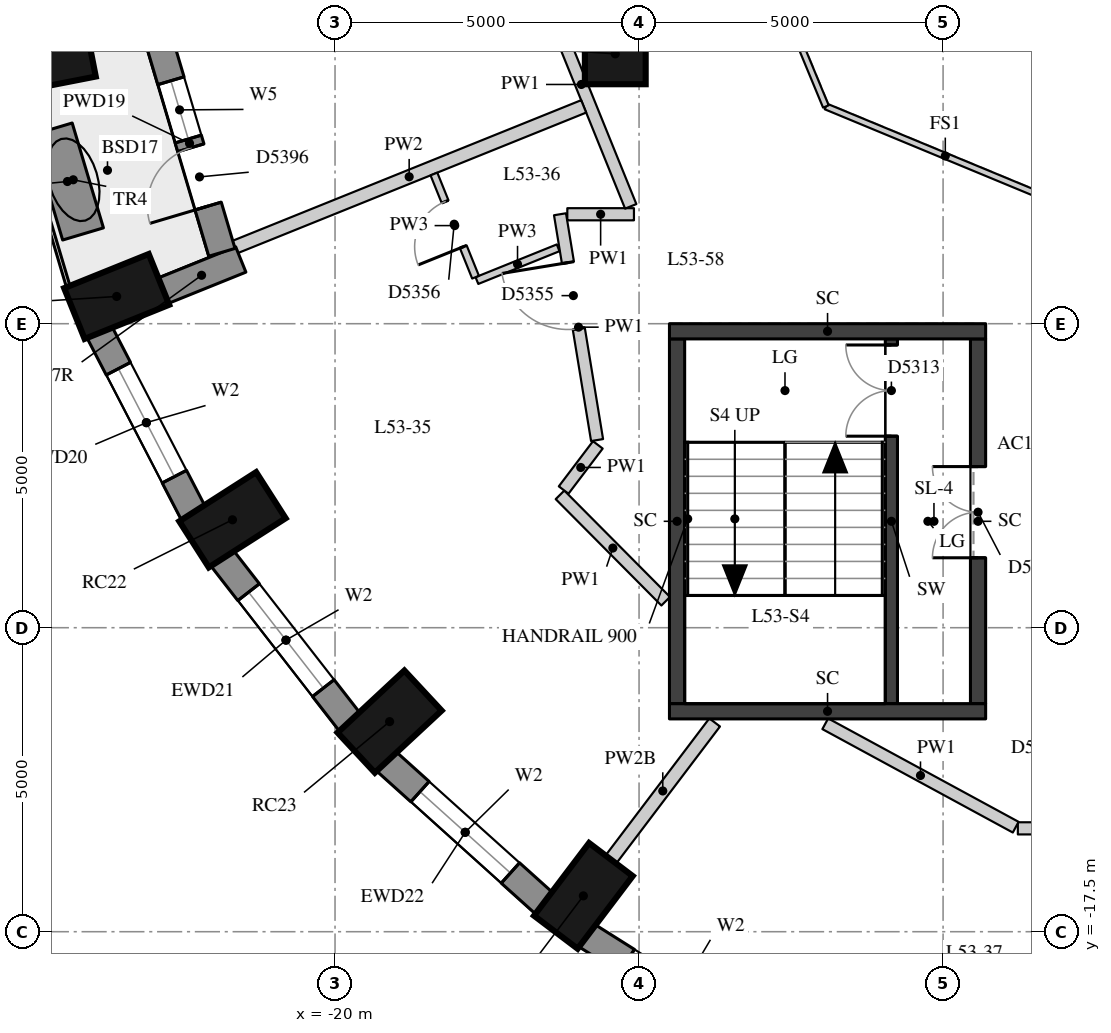
"""IFC4 building model, lengths in metres.
Left out: names, types, materials, properties, quantities, classifications, styles, units other than length and angle.
Written with IfcOpenShell. Run it as: python <this file> out.ifc"""

import sys

from ifc_helpers import new_model, si_unit, direction, frame, frame_2d, origin, origin_2d, place, context, subcontext, project, spatial, rectangle, extrude, element, fill, save


model = new_model("IFC4")
c1 = context("Model", 3, precision=1e-05, world=origin(), true_north=direction((0.0, 1.0)))
c2 = subcontext(c1, "Body", "Model", "MODEL_VIEW")
j1 = project(units=[si_unit("LENGTHUNIT", "METRE"), si_unit("PLANEANGLEUNIT", "RADIAN")], contexts=[c1])
p1 = place(None, origin())
s1 = spatial("IfcSite", under=j1, at=p1, CompositionType="ELEMENT")
p2 = place(p1, origin())
s2 = spatial("IfcBuilding", under=s1, at=p2, CompositionType="ELEMENT")
p3 = place(p2, frame((0.0, 0.0, 189.2)))
s3 = spatial("IfcBuildingStorey", under=s2, at=p3, CompositionType="ELEMENT", Elevation=189.2)
for number, where, z_axis, x_axis in (
    (1, (-24.757, -3.137, 0.0), (0.0, 0.0, 1.0), (-0.981, -0.192, 0.0)),
    (2, (-23.591, -7.052, 0.0), (0.0, 0.0, 1.0), (-0.927, -0.374, 0.0)),
    (3, (-21.687, -10.725, 0.0), (0.0, 0.0, 1.0), (-0.842, -0.539, 0.0)),
    (4, (-19.102, -14.045, 0.0), (0.0, 0.0, 1.0), (-0.732, -0.681, 0.0)),
    (5, (-15.916, -16.911, 0.0), (0.0, 0.0, 1.0), (-0.604, -0.797, 0.0)),
):
    element("IfcColumn", number, at=place(p3, frame(where, z_axis=z_axis, x_axis=x_axis)), inside=s3, PredefinedType="COLUMN", context=c2, shape_type="SweptSolid", body=[
        extrude(rectangle(XDim=1.5, YDim=0.9, at=origin_2d()), origin(), (0.0, 0.0, 1.0), 3.3),
    ])
p4 = place(p3, frame((-15.391, -3.062, 0.0), z_axis=(0.0, 0.0, 1.0), x_axis=(1.0, 0.0, 0.0)))
e6 = element("IfcColumn", 6, at=p4, inside=s3, PredefinedType="COLUMN", context=c2, shape_type="SweptSolid", body=[
    extrude(rectangle(XDim=1.0, YDim=1.0, at=origin_2d()), origin(), (0.0, 0.0, 1.0), 3.3),
])
p5 = place(p3, frame((-23.878, -7.632, 0.0), z_axis=(0.0, 0.0, 1.0), x_axis=(0.460232593174, -0.887798378113, 0.0)))
e7 = element("IfcWall", 7, at=p5, inside=s3, PredefinedType="SOLIDWALL", context=c2, shape_type="SweptSolid", body=[
    extrude(rectangle(XDim=3.371, YDim=0.45, at=frame_2d((1.685, 0.0))), origin(), (0.0, 0.0, 1.0), 3.02),
])
p6 = place(p5, frame((0.685, 0.0, 0.4)))
e8 = element("IfcOpeningElement", 8, at=p6, cuts=e7, PredefinedType="OPENING", context=c2, shape_type="SweptSolid", body=[
    extrude(rectangle(XDim=2.0, YDim=1.75, at=frame_2d((1.0, 0.875))), frame((0.0, 0.235, 0.0), z_axis=(0.0, -1.0, 0.0), x_axis=(1.0, 0.0, 0.0)), (0.0, 0.0, 1.0), 0.47),
])
p7 = place(p3, frame((-21.863, -11.348, 0.0), z_axis=(0.0, 0.0, 1.0), x_axis=(0.614255239631, -0.789107407509, 0.0)))
e9 = element("IfcWall", 9, at=p7, inside=s3, PredefinedType="SOLIDWALL", context=c2, shape_type="SweptSolid", body=[
    extrude(rectangle(XDim=3.438, YDim=0.45, at=frame_2d((1.719, 0.0))), origin(), (0.0, 0.0, 1.0), 3.02),
])
p8 = place(p7, frame((0.719, 0.0, 0.4)))
e10 = element("IfcOpeningElement", 10, at=p8, cuts=e9, PredefinedType="OPENING", context=c2, shape_type="SweptSolid", body=[
    extrude(rectangle(XDim=2.0, YDim=1.75, at=frame_2d((1.0, 0.875))), frame((0.0, 0.235, 0.0), z_axis=(0.0, -1.0, 0.0), x_axis=(1.0, 0.0, 0.0)), (0.0, 0.0, 1.0), 0.47),
])
p9 = place(p3, frame((-19.165, -14.69, 0.0), z_axis=(0.0, 0.0, 1.0), x_axis=(0.743442727602, -0.668799604348, 0.0)))
e11 = element("IfcWall", 11, at=p9, inside=s3, PredefinedType="SOLIDWALL", context=c2, shape_type="SweptSolid", body=[
    extrude(rectangle(XDim=3.513, YDim=0.45, at=frame_2d((1.756, 0.0))), origin(), (0.0, 0.0, 1.0), 3.02),
])
p10 = place(p9, frame((0.756, 0.0, 0.4)))
e12 = element("IfcOpeningElement", 12, at=p10, cuts=e11, PredefinedType="OPENING", context=c2, shape_type="SweptSolid", body=[
    extrude(rectangle(XDim=2.0, YDim=1.75, at=frame_2d((1.0, 0.875))), frame((0.0, 0.235, 0.0), z_axis=(0.0, -1.0, 0.0), x_axis=(1.0, 0.0, 0.0)), (0.0, 0.0, 1.0), 0.47),
])
p11 = place(p3, frame((-15.867, -17.559, 0.0), z_axis=(0.0, 0.0, 1.0), x_axis=(0.84616917791, -0.532914366813, 0.0)))
e13 = element("IfcWall", 13, at=p11, inside=s3, PredefinedType="SOLIDWALL", context=c2, shape_type="SweptSolid", body=[
    extrude(rectangle(XDim=3.587, YDim=0.45, at=frame_2d((1.793, 0.0))), origin(), (0.0, 0.0, 1.0), 3.02),
])
p12 = place(p11, frame((0.793, 0.0, 0.4)))
e14 = element("IfcOpeningElement", 14, at=p12, cuts=e13, PredefinedType="OPENING", context=c2, shape_type="SweptSolid", body=[
    extrude(rectangle(XDim=2.0, YDim=1.75, at=frame_2d((1.0, 0.875))), frame((0.0, 0.235, 0.0), z_axis=(0.0, -1.0, 0.0), x_axis=(1.0, 0.0, 0.0)), (0.0, 0.0, 1.0), 0.47),
])
p13 = place(p3, frame((-22.84, -6.964, 0.0), z_axis=(0.0, 0.0, 1.0), x_axis=(0.92737073954, 0.374143704271, 0.0)))
e15 = element("IfcWall", 15, at=p13, inside=s3, PredefinedType="SOLIDWALL", context=c2, shape_type="SweptSolid", body=[
    extrude(rectangle(XDim=1.391, YDim=0.45, at=frame_2d((0.695, 0.0))), origin(), (0.0, 0.0, 1.0), 3.02),
])
p14 = place(p3, frame((-22.925, -2.743, 0.0), z_axis=(0.0, 0.0, 1.0), x_axis=(0.284722093158, -0.958610103049, 0.0)))
e16 = element("IfcWall", 16, at=p14, inside=s3, PredefinedType="SOLIDWALL", context=c2, shape_type="SweptSolid", body=[
    extrude(rectangle(XDim=3.738, YDim=0.45, at=frame_2d((1.869, 0.0))), origin(), (0.0, 0.0, 1.0), 3.02),
])
p15 = place(p14, frame((0.794, 0.0, 0.4)))
e17 = element("IfcOpeningElement", 17, at=p15, cuts=e16, PredefinedType="OPENING", context=c2, shape_type="SweptSolid", body=[
    extrude(rectangle(XDim=1.0, YDim=1.75, at=frame_2d((0.5, 0.875))), frame((0.0, 0.235, 0.0), z_axis=(0.0, -1.0, 0.0), x_axis=(1.0, 0.0, 0.0)), (0.0, 0.0, 1.0), 0.47),
])
p16 = place(p14, frame((1.944, 0.0, 0.0)))
e18 = element("IfcOpeningElement", 18, at=p16, cuts=e16, PredefinedType="OPENING", context=c2, shape_type="SweptSolid", body=[
    extrude(rectangle(XDim=1.0, YDim=2.15, at=frame_2d((0.5, 1.075))), frame((0.0, 0.235, 0.0), z_axis=(0.0, -1.0, 0.0), x_axis=(1.0, 0.0, 0.0)), (0.0, 0.0, 1.0), 0.47),
])
p17 = place(p3, frame((-24.658, -4.299, 0.0), z_axis=(0.0, 0.0, 1.0), x_axis=(0.285505743157, -0.958376998171, 0.0)))
e19 = element("IfcWall", 19, at=p17, inside=s3, PredefinedType="USERDEFINED", context=c2, shape_type="SweptSolid", body=[
    extrude(rectangle(XDim=1.8, YDim=0.7, at=frame_2d((0.9, 0.0))), origin(), (0.0, 0.0, 1.0), 0.75),
])
p18 = place(p3, frame((-10.85, -13.75, 0.0), z_axis=(0.0, 0.0, 1.0), x_axis=(0.0, 1.0, 0.0)))
e20 = element("IfcWall", 20, at=p18, inside=s3, PredefinedType="SHEAR", context=c2, shape_type="SweptSolid", body=[
    extrude(rectangle(XDim=6.0, YDim=0.2, at=frame_2d((3.0, 0.0))), origin(), (0.0, 0.0, 1.0), 3.02),
])
p19 = place(p18, frame((4.4, 0.0, 0.0)))
e21 = element("IfcOpeningElement", 21, at=p19, cuts=e20, PredefinedType="OPENING", context=c2, shape_type="SweptSolid", body=[
    extrude(rectangle(XDim=1.5, YDim=2.1, at=frame_2d((0.75, 1.05))), frame((0.0, 0.11, 0.0), z_axis=(0.0, -1.0, 0.0), x_axis=(1.0, 0.0, 0.0)), (0.0, 0.0, 1.0), 0.22),
])
p20 = place(p3, frame((-14.375, -13.75, -0.28), z_axis=(0.0, 0.0, 1.0), x_axis=(0.0, 1.0, 0.0)))
e22 = element("IfcWall", 22, at=p20, inside=s3, PredefinedType="SHEAR", context=c2, shape_type="SweptSolid", body=[
    extrude(rectangle(XDim=6.0, YDim=0.25, at=frame_2d((3.0, 0.0))), origin(), (0.0, 0.0, 1.0), 3.3),
])
p21 = place(p3, frame((-9.425, -13.75, -0.28), z_axis=(0.0, 0.0, 1.0), x_axis=(0.0, 1.0, 0.0)))
e23 = element("IfcWall", 23, at=p21, inside=s3, PredefinedType="SHEAR", context=c2, shape_type="SweptSolid", body=[
    extrude(rectangle(XDim=6.0, YDim=0.25, at=frame_2d((3.0, 0.0))), origin(), (0.0, 0.0, 1.0), 3.3),
])
p22 = place(p21, frame((2.4, 0.0, 0.28)))
e24 = element("IfcOpeningElement", 24, at=p22, cuts=e23, PredefinedType="OPENING", context=c2, shape_type="SweptSolid", body=[
    extrude(rectangle(XDim=1.5, YDim=2.1, at=frame_2d((0.75, 1.05))), frame((0.0, 0.135, 0.0), z_axis=(0.0, -1.0, 0.0), x_axis=(1.0, 0.0, 0.0)), (0.0, 0.0, 1.0), 0.27),
])
for number, where, z_axis, x_axis in (
    (25, (-14.5, -7.625, -0.28), (0.0, 0.0, 1.0), (1.0, 0.0, 0.0)),
    (26, (-14.5, -13.875, -0.28), (0.0, 0.0, 1.0), (1.0, 0.0, 0.0)),
):
    element("IfcWall", number, at=place(p3, frame(where, z_axis=z_axis, x_axis=x_axis)), inside=s3, PredefinedType="SHEAR", context=c2, shape_type="SweptSolid", body=[
        extrude(rectangle(XDim=5.2, YDim=0.25, at=frame_2d((2.6, 0.0))), origin(), (0.0, 0.0, 1.0), 3.3),
    ])
p23 = place(p3, frame((-7.8, -15.8, 0.0), z_axis=(0.0, 0.0, 1.0), x_axis=(-1.0, 0.0, 0.0)))
e27 = element("IfcWall", 27, at=p23, inside=s3, PredefinedType="PARTITIONING", context=c2, shape_type="SweptSolid", body=[
    extrude(rectangle(XDim=0.97, YDim=0.2, at=frame_2d((0.485, 0.0))), origin(), (0.0, 0.0, 1.0), 3.02),
])
p24 = place(p3, frame((-8.806, -15.781, 0.0), z_axis=(0.0, 0.0, 1.0), x_axis=(-0.878760680736, 0.477262680284, 0.0)))
e28 = element("IfcWall", 28, at=p24, inside=s3, PredefinedType="PARTITIONING", context=c2, shape_type="SweptSolid", body=[
    extrude(rectangle(XDim=3.564, YDim=0.2, at=frame_2d((1.782, 0.0))), origin(), (0.0, 0.0, 1.0), 3.02),
])
p25 = place(p3, frame((-14.562, -12.064, 0.0), z_axis=(0.0, 0.0, 1.0), x_axis=(-0.704826289083, 0.709379942074, 0.0)))
e29 = element("IfcWall", 29, at=p25, inside=s3, PredefinedType="PARTITIONING", context=c2, shape_type="SweptSolid", body=[
    extrude(rectangle(XDim=2.466, YDim=0.2, at=frame_2d((1.233, 0.0))), origin(), (0.0, 0.0, 1.0), 3.02),
])
p26 = place(p3, frame((-16.24, -10.236, 0.0), z_axis=(0.0, 0.0, 1.0), x_axis=(0.60389301212, 0.797065386222, 0.0)))
e30 = element("IfcWall", 30, at=p26, inside=s3, PredefinedType="PARTITIONING", context=c2, shape_type="SweptSolid", body=[
    extrude(rectangle(XDim=0.931, YDim=0.2, at=frame_2d((0.466, 0.0))), origin(), (0.0, 0.0, 1.0), 3.02),
])
p27 = place(p3, frame((-15.69, -9.414, 0.0), z_axis=(0.0, 0.0, 1.0), x_axis=(-0.161968669214, 0.986795900981, 0.0)))
e31 = element("IfcWall", 31, at=p27, inside=s3, PredefinedType="PARTITIONING", context=c2, shape_type="SweptSolid", body=[
    extrude(rectangle(XDim=3.764, YDim=0.2, at=frame_2d((1.882, 0.0))), origin(), (0.0, 0.0, 1.0), 3.02),
])
p28 = place(p27, frame((1.858, 0.0, 0.0)))
e32 = element("IfcOpeningElement", 32, at=p28, cuts=e31, PredefinedType="OPENING", context=c2, shape_type="SweptSolid", body=[
    extrude(rectangle(XDim=1.1, YDim=2.1, at=frame_2d((0.55, 1.05))), frame((0.0, 0.11, 0.0), z_axis=(0.0, -1.0, 0.0), x_axis=(1.0, 0.0, 0.0)), (0.0, 0.0, 1.0), 0.22),
])
p29 = place(p3, frame((-16.18, -5.7, 0.0), z_axis=(0.0, 0.0, 1.0), x_axis=(1.0, 0.0, 0.0)))
e33 = element("IfcWall", 33, at=p29, inside=s3, PredefinedType="PARTITIONING", context=c2, shape_type="SweptSolid", body=[
    extrude(rectangle(XDim=1.096, YDim=0.2, at=frame_2d((0.548, 0.0))), origin(), (0.0, 0.0, 1.0), 3.02),
])
p30 = place(p3, frame((-15.137, -5.57, 0.0), z_axis=(0.0, 0.0, 1.0), x_axis=(-0.375464059939, 0.926836954213, 0.0)))
e34 = element("IfcWall", 34, at=p30, inside=s3, PredefinedType="PARTITIONING", context=c2, shape_type="SweptSolid", body=[
    extrude(rectangle(XDim=4.326, YDim=0.2, at=frame_2d((2.163, 0.0))), origin(), (0.0, 0.0, 1.0), 3.02),
])
p31 = place(p3, frame((-21.651, -6.241, 0.0), z_axis=(0.0, 0.0, 1.0), x_axis=(0.927381885483, 0.374116076208, 0.0)))
e35 = element("IfcWall", 35, at=p31, inside=s3, PredefinedType="PARTITIONING", context=c2, shape_type="SweptSolid", body=[
    extrude(rectangle(XDim=6.19, YDim=0.22, at=frame_2d((3.095, 0.0))), origin(), (0.0, 0.0, 1.0), 3.02),
])
p32 = place(p3, frame((-15.463, -16.312, 0.0), z_axis=(0.0, 0.0, 1.0), x_axis=(0.603613294085, 0.797277236101, 0.0)))
e36 = element("IfcWall", 36, at=p32, inside=s3, PredefinedType="PARTITIONING", context=c2, shape_type="SweptSolid", body=[
    extrude(rectangle(XDim=2.828, YDim=0.22, at=frame_2d((1.414, 0.0))), origin(), (0.0, 0.0, 1.0), 2.57),
])
p33 = place(p3, frame((-16.331, -6.252, 0.0), z_axis=(0.0, 0.0, 1.0), x_axis=(-0.927409233125, -0.374048278053, 0.0)))
e37 = element("IfcWall", 37, at=p33, inside=s3, PredefinedType="PARTITIONING", context=c2, shape_type="SweptSolid", body=[
    extrude(rectangle(XDim=1.44, YDim=0.12, at=frame_2d((0.72, 0.0))), origin(), (0.0, 0.0, 1.0), 3.02),
])
p34 = place(p3, frame((-17.689, -6.735, 0.0), z_axis=(0.0, 0.0, 1.0), x_axis=(-0.374057168462, 0.927405647342, 0.0)))
e38 = element("IfcWall", 38, at=p34, inside=s3, PredefinedType="PARTITIONING", context=c2, shape_type="SweptSolid", body=[
    extrude(rectangle(XDim=1.83, YDim=0.12, at=frame_2d((0.915, 0.0))), origin(), (0.0, 0.0, 1.0), 3.02),
])
p35 = place(p34, frame((0.54, 0.0, 0.0)))
e39 = element("IfcOpeningElement", 39, at=p35, cuts=e38, PredefinedType="OPENING", context=c2, shape_type="SweptSolid", body=[
    extrude(rectangle(XDim=0.8, YDim=2.1, at=frame_2d((0.4, 1.05))), frame((0.0, 0.07, 0.0), z_axis=(0.0, -1.0, 0.0), x_axis=(1.0, 0.0, 0.0)), (0.0, 0.0, 1.0), 0.14),
])
for number, where, z_axis, x_axis in (
    (40, (-8.0, -5.554, 0.0), (0.0, 0.0, 1.0), (-0.924, 0.383, 0.0)),
    (41, (-11.927, -3.927, 0.0), (0.0, 0.0, 1.0), (-0.383, 0.924, 0.0)),
):
    element("IfcWall", number, at=place(p3, frame(where, z_axis=z_axis, x_axis=x_axis)), inside=s3, PredefinedType="PARTITIONING", context=c2, shape_type="SweptSolid", body=[
        extrude(rectangle(XDim=4.251, YDim=0.1, at=frame_2d((2.125, 0.0))), origin(), (0.0, 0.0, 1.0), 3.02),
    ])
p36 = place(p6, origin())
e42 = element("IfcWindow", 42, at=p36, inside=s3, PartitioningType="SINGLE_PANEL", PredefinedType="WINDOW", context=c2, shape_type="SweptSolid", body=[
    extrude(rectangle(XDim=2.0, YDim=1.75, at=frame_2d((1.0, 0.875))), frame((0.0, 0.035, 0.0), z_axis=(0.0, -1.0, 0.0), x_axis=(1.0, 0.0, 0.0)), (0.0, 0.0, 1.0), 0.06),
])
fill(e8, e42)
p37 = place(p8, origin())
e43 = element("IfcWindow", 43, at=p37, inside=s3, PartitioningType="SINGLE_PANEL", PredefinedType="WINDOW", context=c2, shape_type="SweptSolid", body=[
    extrude(rectangle(XDim=2.0, YDim=1.75, at=frame_2d((1.0, 0.875))), frame((0.0, 0.035, 0.0), z_axis=(0.0, -1.0, 0.0), x_axis=(1.0, 0.0, 0.0)), (0.0, 0.0, 1.0), 0.06),
])
fill(e10, e43)
p38 = place(p10, origin())
e44 = element("IfcWindow", 44, at=p38, inside=s3, PartitioningType="SINGLE_PANEL", PredefinedType="WINDOW", context=c2, shape_type="SweptSolid", body=[
    extrude(rectangle(XDim=2.0, YDim=1.75, at=frame_2d((1.0, 0.875))), frame((0.0, 0.035, 0.0), z_axis=(0.0, -1.0, 0.0), x_axis=(1.0, 0.0, 0.0)), (0.0, 0.0, 1.0), 0.06),
])
fill(e12, e44)
p39 = place(p15, origin())
e45 = element("IfcWindow", 45, at=p39, inside=s3, PartitioningType="SINGLE_PANEL", PredefinedType="WINDOW", context=c2, shape_type="SweptSolid", body=[
    extrude(rectangle(XDim=1.0, YDim=1.75, at=frame_2d((0.5, 0.875))), frame((0.0, 0.035, 0.0), z_axis=(0.0, -1.0, 0.0), x_axis=(1.0, 0.0, 0.0)), (0.0, 0.0, 1.0), 0.06),
])
fill(e17, e45)
p40 = place(p16, frame((1.0, 0.0, 0.0), z_axis=(0.0, 0.0, 1.0), x_axis=(-1.0, 0.0, 0.0)))
e46 = element("IfcDoor", 46, at=p40, inside=s3, OperationType="SINGLE_SWING_LEFT", PredefinedType="DOOR", context=c2, shape_type="SweptSolid", body=[
    extrude(rectangle(XDim=1.0, YDim=2.15, at=frame_2d((0.5, 1.075))), frame((0.0, 0.075, 0.0), z_axis=(0.0, -1.0, 0.0), x_axis=(1.0, 0.0, 0.0)), (0.0, 0.0, 1.0), 0.05),
])
fill(e18, e46)
p41 = place(p19, origin())
e47 = element("IfcDoor", 47, at=p41, inside=s3, OperationType="DOUBLE_DOOR_SINGLE_SWING", PredefinedType="DOOR", context=c2, shape_type="SweptSolid", body=[
    extrude(rectangle(XDim=1.5, YDim=2.1, at=frame_2d((0.75, 1.05))), frame((0.0, 0.025, 0.0), z_axis=(0.0, -1.0, 0.0), x_axis=(1.0, 0.0, 0.0)), (0.0, 0.0, 1.0), 0.05),
])
fill(e21, e47)
p42 = place(p22, origin())
e48 = element("IfcDoor", 48, at=p42, inside=s3, OperationType="DOUBLE_DOOR_SINGLE_SWING", PredefinedType="DOOR", context=c2, shape_type="SweptSolid", body=[
    extrude(rectangle(XDim=1.5, YDim=2.1, at=frame_2d((0.75, 1.05))), frame((0.0, 0.025, 0.0), z_axis=(0.0, -1.0, 0.0), x_axis=(1.0, 0.0, 0.0)), (0.0, 0.0, 1.0), 0.05),
])
fill(e24, e48)
p43 = place(p28, origin())
e49 = element("IfcDoor", 49, at=p43, inside=s3, OperationType="SINGLE_SWING_RIGHT", PredefinedType="DOOR", context=c2, shape_type="SweptSolid", body=[
    extrude(rectangle(XDim=1.1, YDim=2.1, at=frame_2d((0.55, 1.05))), frame((0.0, 0.025, 0.0), z_axis=(0.0, -1.0, 0.0), x_axis=(1.0, 0.0, 0.0)), (0.0, 0.0, 1.0), 0.05),
])
fill(e32, e49)
p44 = place(p35, origin())
e50 = element("IfcDoor", 50, at=p44, inside=s3, OperationType="SINGLE_SWING_LEFT", PredefinedType="DOOR", context=c2, shape_type="SweptSolid", body=[
    extrude(rectangle(XDim=0.8, YDim=2.1, at=frame_2d((0.4, 1.05))), frame((0.0, 0.025, 0.0), z_axis=(0.0, -1.0, 0.0), x_axis=(1.0, 0.0, 0.0)), (0.0, 0.0, 1.0), 0.05),
])
fill(e39, e50)
save(model, sys.argv[1])
